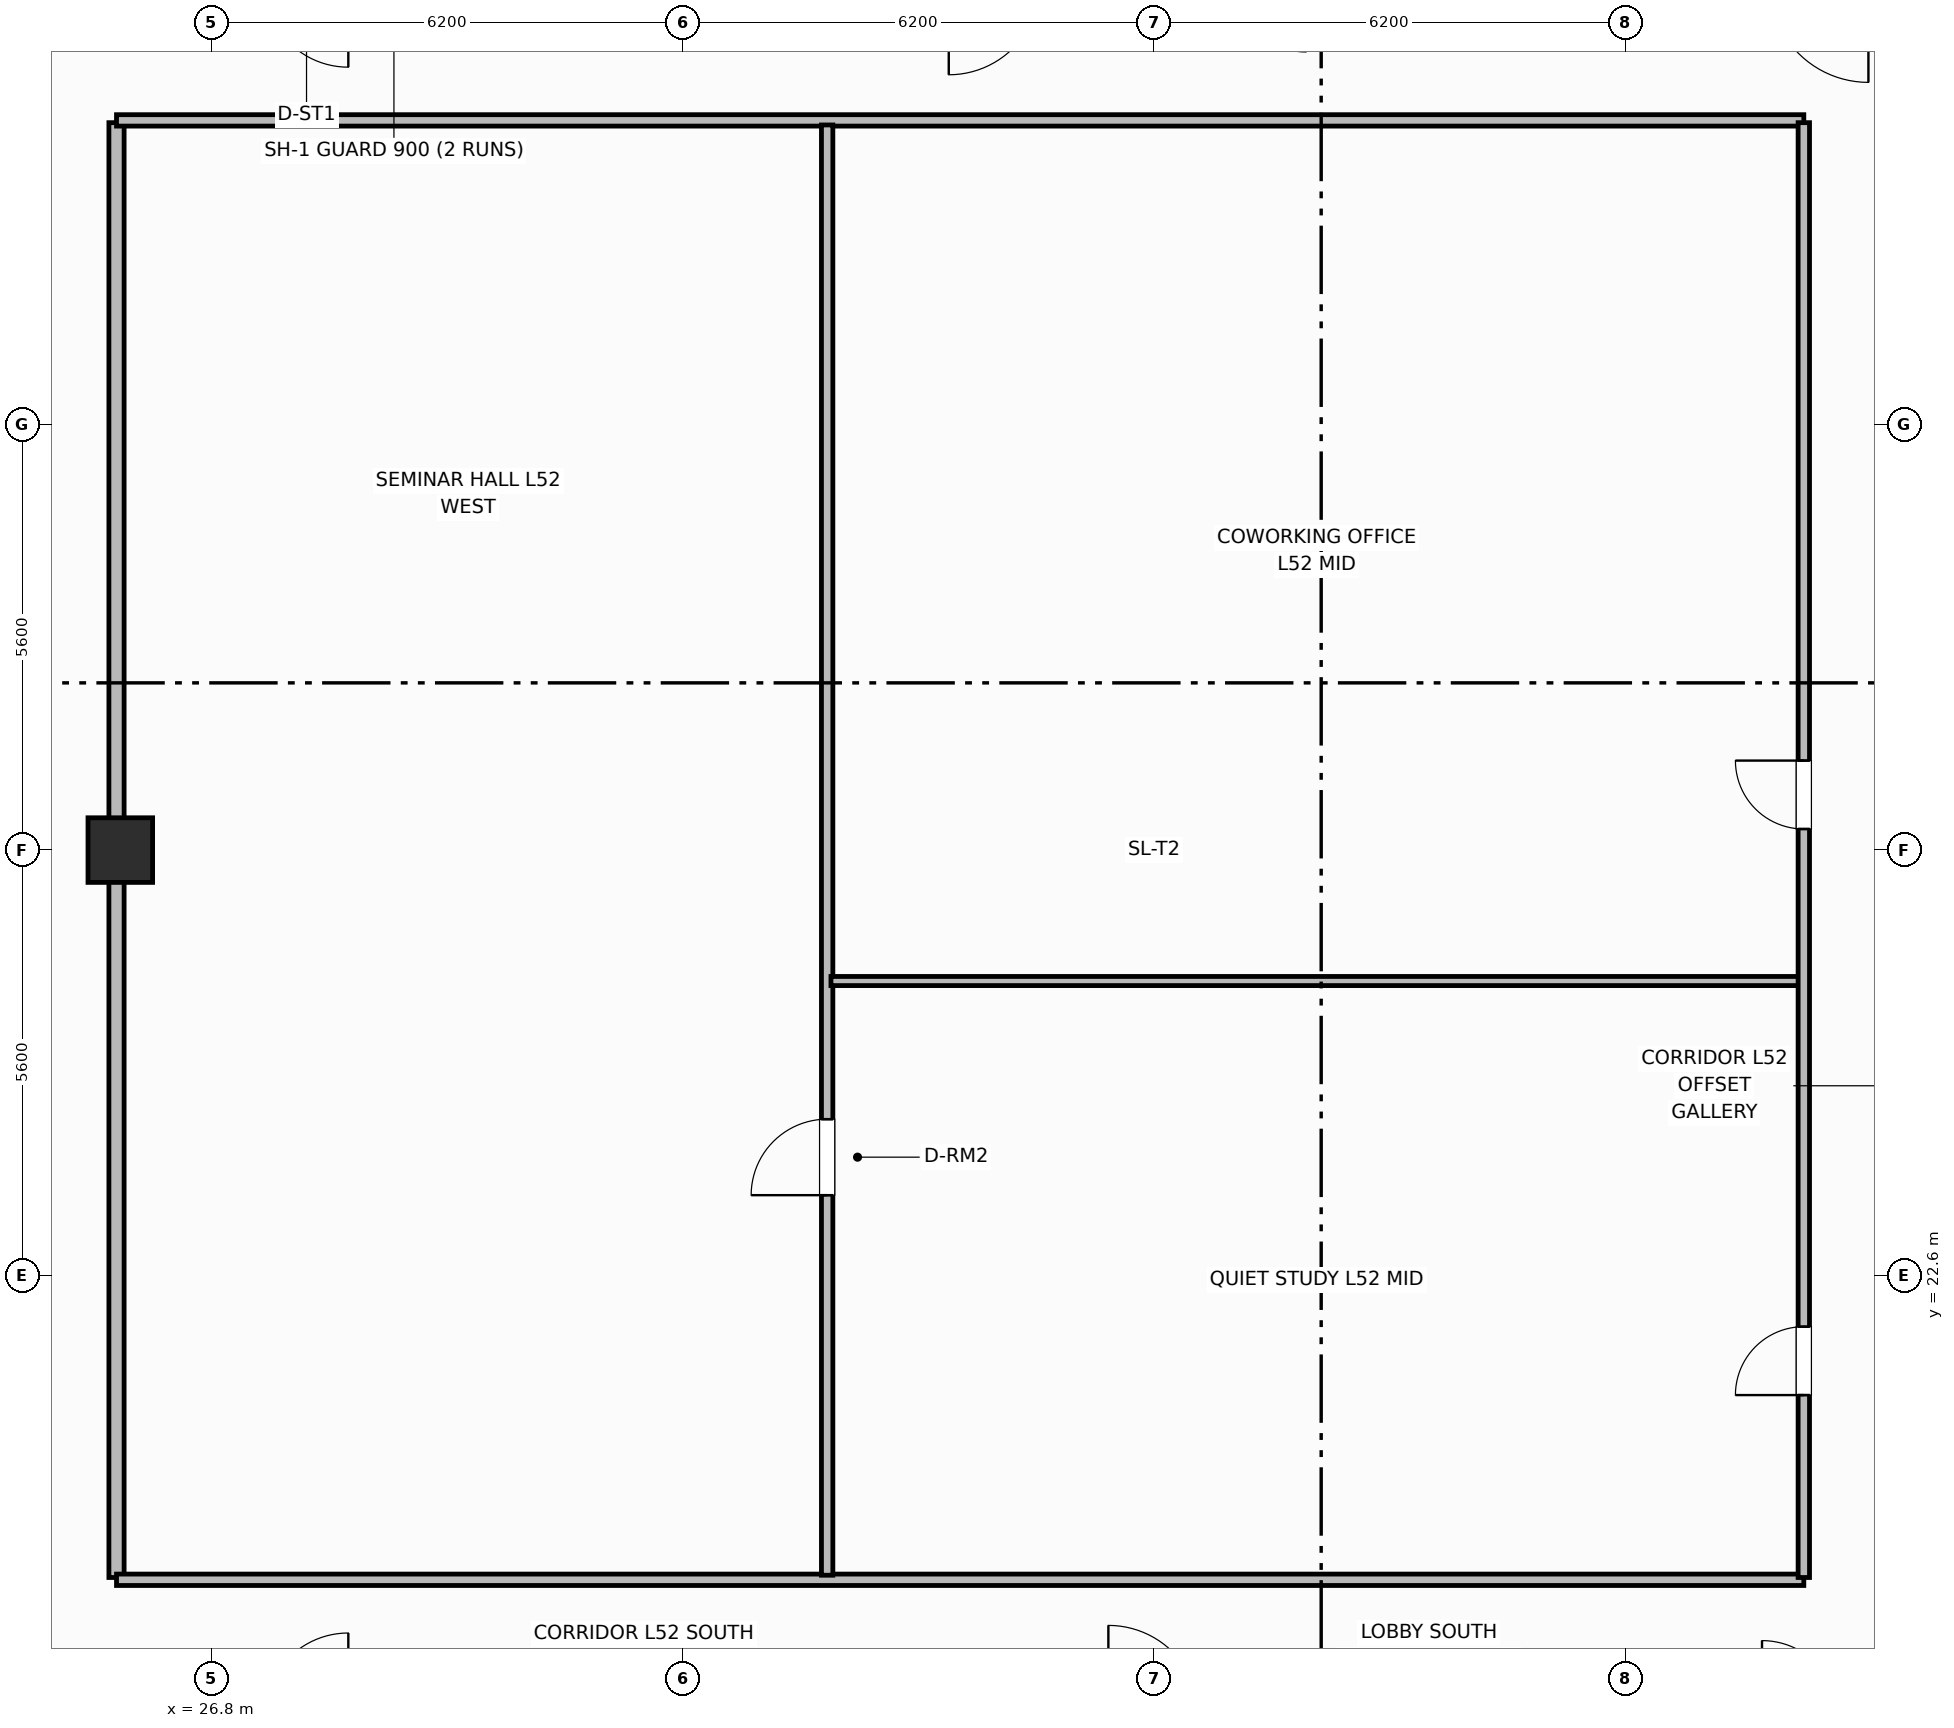
"""IFC4 building model, lengths in metres.
Left out: names, types, materials, properties, quantities, classifications, styles, units other than length and angle.
Written with IfcOpenShell. Run it as: python <this file> out.ifc"""

import sys

from ifc_helpers import new_model, si_unit, direction, frame, frame_2d, origin, origin_2d, place, context, subcontext, project, spatial, rectangle, extrude, element, fill, save


model = new_model("IFC4")
c1 = context("Model", 3, precision=1e-05, world=origin(), true_north=direction((0.0, 1.0)))
c2 = subcontext(c1, "Body", "Model", "MODEL_VIEW")
j1 = project(units=[si_unit("LENGTHUNIT", "METRE"), si_unit("PLANEANGLEUNIT", "RADIAN")], contexts=[c1])
p1 = place(None, origin())
s1 = spatial("IfcSite", under=j1, at=p1, CompositionType="ELEMENT")
p2 = place(p1, origin())
s2 = spatial("IfcBuilding", under=s1, at=p2, CompositionType="ELEMENT")
p3 = place(p2, frame((0.0, 0.0, 211.0)))
s3 = spatial("IfcBuildingStorey", under=s2, at=p3, CompositionType="ELEMENT", Elevation=211.0)
p4 = place(p3, frame((25.6, 28.2, 0.0), z_axis=(0.0, 0.0, 1.0), x_axis=(1.0, 0.0, 0.0)))
e1 = element("IfcColumn", 1, at=p4, inside=s3, PredefinedType="COLUMN", context=c2, shape_type="SweptSolid", body=[
    extrude(rectangle(XDim=0.85, YDim=0.85, at=origin_2d()), origin(), (0.0, 0.0, 1.0), 3.7),
])
p5 = place(p3, frame((25.55, 18.63, 0.0), z_axis=(0.0, 0.0, 1.0), x_axis=(0.0, 1.0, 0.0)))
e2 = element("IfcWall", 2, at=p5, inside=s3, PredefinedType="PARTITIONING", context=c2, shape_type="SweptSolid", body=[
    extrude(rectangle(XDim=19.14, YDim=0.2, at=frame_2d((9.57, 0.0))), origin(), (0.0, 0.0, 1.0), 2.55),
])
for number, where, z_axis, x_axis in (
    (3, (25.55, 18.6, 0.0), (0.0, 0.0, 1.0), (1.0, 0.0, 0.0)),
    (4, (25.55, 37.8, 0.0), (0.0, 0.0, 1.0), (1.0, 0.0, 0.0)),
):
    element("IfcWall", number, at=place(p3, frame(where, z_axis=z_axis, x_axis=x_axis)), inside=s3, PredefinedType="PARTITIONING", context=c2, shape_type="SweptSolid", body=[
        extrude(rectangle(XDim=22.2, YDim=0.15, at=frame_2d((11.1, 0.0))), origin(), (0.0, 0.0, 1.0), 2.55),
    ])
p6 = place(p3, frame((34.9, 18.66, 0.0), z_axis=(0.0, 0.0, 1.0), x_axis=(0.0, 1.0, 0.0)))
e5 = element("IfcWall", 5, at=p6, inside=s3, PredefinedType="PARTITIONING", context=c2, shape_type="SweptSolid", body=[
    extrude(rectangle(XDim=19.08, YDim=0.15, at=frame_2d((9.54, 0.0))), origin(), (0.0, 0.0, 1.0), 2.55),
])
p7 = place(p6, frame((5.0, 0.0, 0.0)))
e6 = element("IfcOpeningElement", 6, at=p7, cuts=e5, PredefinedType="OPENING", context=c2, shape_type="SweptSolid", body=[
    extrude(rectangle(XDim=1.0, YDim=2.15, at=frame_2d((0.5, 1.075))), frame((0.0, 0.085, 0.0), z_axis=(0.0, -1.0, 0.0), x_axis=(1.0, 0.0, 0.0)), (0.0, 0.0, 1.0), 0.17),
])
p8 = place(p3, frame((34.95, 26.477, 0.0), z_axis=(0.0, 0.0, 1.0), x_axis=(1.0, 0.0, 0.0)))
e7 = element("IfcWall", 7, at=p8, inside=s3, PredefinedType="PARTITIONING", context=c2, shape_type="SweptSolid", body=[
    extrude(rectangle(XDim=12.81, YDim=0.12, at=frame_2d((6.405, 0.0))), origin(), (0.0, 0.0, 1.0), 2.55),
])
p9 = place(p3, frame((47.75, 18.63, 0.0), z_axis=(0.0, 0.0, 1.0), x_axis=(0.0, 1.0, 0.0)))
e8 = element("IfcWall", 8, at=p9, inside=s3, PredefinedType="PARTITIONING", context=c2, shape_type="SweptSolid", body=[
    extrude(rectangle(XDim=19.14, YDim=0.15, at=frame_2d((9.57, 0.0))), origin(), (0.0, 0.0, 1.0), 2.55),
])
p10 = place(p9, frame((2.4, 0.0, 0.0)))
e9 = element("IfcOpeningElement", 9, at=p10, cuts=e8, PredefinedType="OPENING", context=c2, shape_type="SweptSolid", body=[
    extrude(rectangle(XDim=0.9, YDim=2.1, at=frame_2d((0.45, 1.05))), frame((0.0, 0.085, 0.0), z_axis=(0.0, -1.0, 0.0), x_axis=(1.0, 0.0, 0.0)), (0.0, 0.0, 1.0), 0.17),
])
p11 = place(p9, frame((9.847, 0.0, 0.0)))
e10 = element("IfcOpeningElement", 10, at=p11, cuts=e8, PredefinedType="OPENING", context=c2, shape_type="SweptSolid", body=[
    extrude(rectangle(XDim=0.9, YDim=2.1, at=frame_2d((0.45, 1.05))), frame((0.0, 0.085, 0.0), z_axis=(0.0, -1.0, 0.0), x_axis=(1.0, 0.0, 0.0)), (0.0, 0.0, 1.0), 0.17),
])
p12 = place(p7, origin())
e11 = element("IfcDoor", 11, at=p12, inside=s3, OperationType="SINGLE_SWING_LEFT", PredefinedType="DOOR", context=c2, shape_type="SweptSolid", body=[
    extrude(rectangle(XDim=1.0, YDim=2.15, at=frame_2d((0.5, 1.075))), frame((0.0, 0.025, 0.0), z_axis=(0.0, -1.0, 0.0), x_axis=(1.0, 0.0, 0.0)), (0.0, 0.0, 1.0), 0.05),
])
fill(e6, e11)
p13 = place(p10, origin())
e12 = element("IfcDoor", 12, at=p13, inside=s3, OperationType="SINGLE_SWING_LEFT", PredefinedType="DOOR", context=c2, shape_type="SweptSolid", body=[
    extrude(rectangle(XDim=0.9, YDim=2.1, at=frame_2d((0.45, 1.05))), frame((0.0, 0.025, 0.0), z_axis=(0.0, -1.0, 0.0), x_axis=(1.0, 0.0, 0.0)), (0.0, 0.0, 1.0), 0.05),
])
fill(e9, e12)
p14 = place(p11, origin())
e13 = element("IfcDoor", 13, at=p14, inside=s3, OperationType="SINGLE_SWING_RIGHT", PredefinedType="DOOR", context=c2, shape_type="SweptSolid", body=[
    extrude(rectangle(XDim=0.9, YDim=2.1, at=frame_2d((0.45, 1.05))), frame((0.0, 0.025, 0.0), z_axis=(0.0, -1.0, 0.0), x_axis=(1.0, 0.0, 0.0)), (0.0, 0.0, 1.0), 0.05),
])
fill(e10, e13)
save(model, sys.argv[1])
